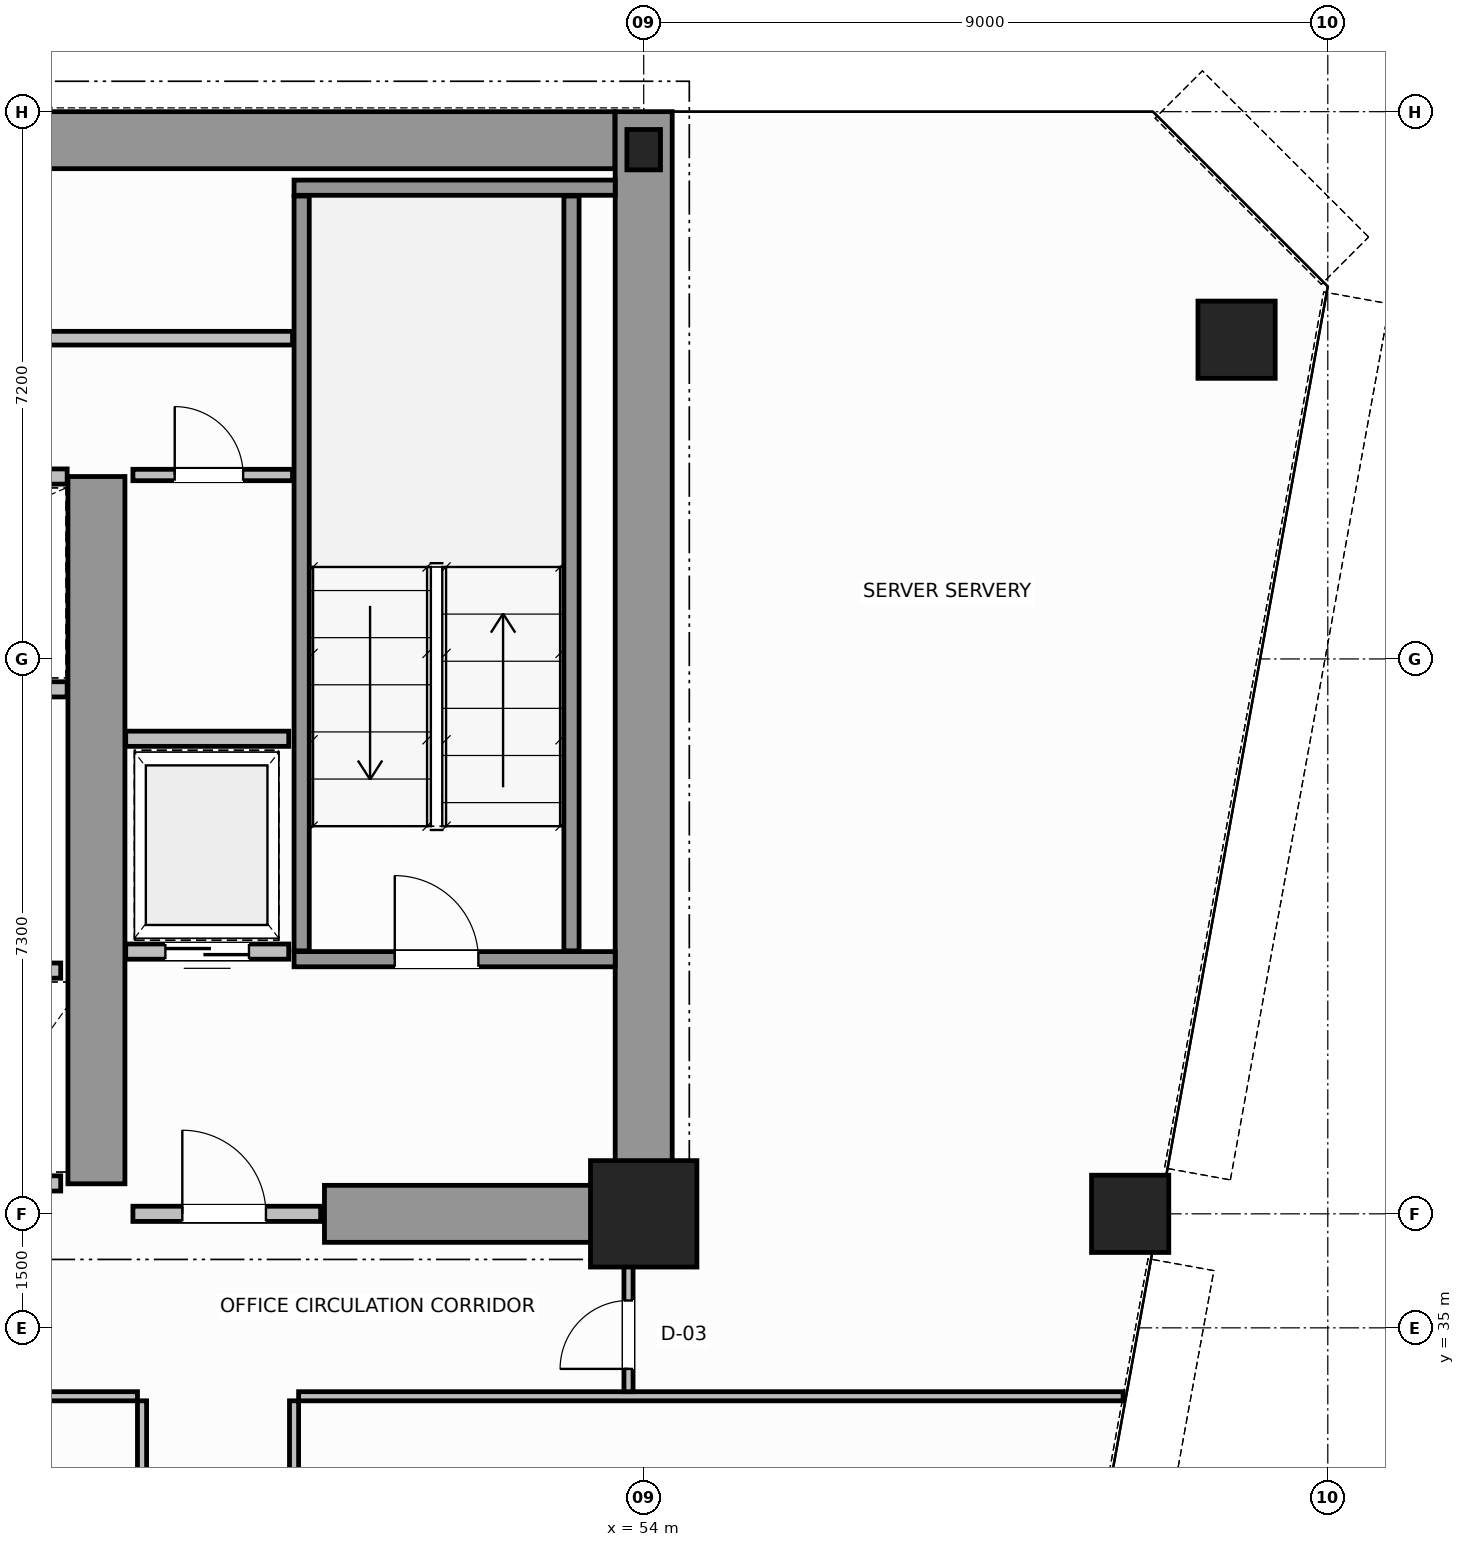
"""IFC4 building model, lengths in metres.
Left out: names, types, materials, properties, quantities, classifications, styles, units other than length and angle.
Written with IfcOpenShell. Run it as: python <this file> out.ifc"""

import sys

from ifc_helpers import new_model, si_unit, direction, frame, frame_2d, origin, origin_2d, place, context, subcontext, project, spatial, rectangle, hollow_circle, i_section, extrude, source, transform, mapped, element, fill, save


model = new_model("IFC4")
c1 = context("Model", 3, precision=1e-05, world=origin(), true_north=direction((0.0, 1.0)))
c2 = subcontext(c1, "Body", "Model", "MODEL_VIEW")
j1 = project(units=[si_unit("LENGTHUNIT", "METRE"), si_unit("PLANEANGLEUNIT", "RADIAN")], contexts=[c1])
p1 = place(None, origin())
s1 = spatial("IfcSite", under=j1, at=p1, CompositionType="ELEMENT")
p2 = place(p1, origin())
s2 = spatial("IfcBuilding", under=s1, at=p2, CompositionType="ELEMENT")
p3 = place(p2, frame((0.0, 0.0, 130.0)))
s3 = spatial("IfcBuildingStorey", under=s2, at=p3, CompositionType="ELEMENT", Elevation=130.0)
m1 = source(origin(), c2, "Body", "SweptSolid", [
    extrude(rectangle(XDim=1.4, YDim=1.4, at=origin_2d()), origin(), (0.0, 0.0, 1.0), 3.8),
])
p4 = place(p3, frame((54.0, 36.5, 0.0), z_axis=(0.0, 0.0, 1.0), x_axis=(1.0, 0.0, 0.0)))
e1 = element("IfcColumn", 1, at=p4, inside=s3, PredefinedType="COLUMN", context=c2, shape_type="MappedRepresentation", body=[
    mapped(m1, transform((0.0, 0.0, 0.0), scale=1.0)),
])
m2 = source(origin(), c2, "Body", "SweptSolid", [
    extrude(i_section(OverallWidth=0.442, OverallDepth=0.531, WebThickness=0.065, FlangeThickness=0.076, FilletRadius=0.015, at=origin_2d()), origin(), (0.0, 0.0, 1.0), 3.8),
])
p5 = place(p3, frame((54.0, 50.5, 0.0), z_axis=(0.0, 0.0, 1.0), x_axis=(1.0, 0.0, 0.0)))
e2 = element("IfcColumn", 2, at=p5, inside=s3, PredefinedType="COLUMN", context=c2, shape_type="MappedRepresentation", body=[
    mapped(m2, transform((0.0, 0.0, 0.0), scale=1.0)),
])
m3 = source(origin(), c2, "Body", "SweptSolid", [
    extrude(hollow_circle(Radius=0.508, WallThickness=0.045, at=origin_2d()), origin(), (0.0, 0.0, 1.0), 3.8),
])
for number, where, z_axis, x_axis in (
    (3, (61.8, 48.0, 0.0), (0.0, 0.0, 1.0), (1.0, 0.0, 0.0)),
    (4, (60.4, 36.5, 0.0), (0.0, 0.0, 1.0), (1.0, 0.0, 0.0)),
):
    element("IfcColumn", number, at=place(p3, frame(where, z_axis=z_axis, x_axis=x_axis)), inside=s3, PredefinedType="COLUMN", context=c2, shape_type="MappedRepresentation", body=[
        mapped(m3, transform((0.0, 0.0, 0.0), scale=1.0)),
    ])
p6 = place(p3, frame((34.002, 50.625, 0.0), z_axis=(0.0, 0.0, 1.0), x_axis=(1.0, 0.0, 0.0)))
e5 = element("IfcWall", 5, at=p6, inside=s3, PredefinedType="SHEAR", context=c2, shape_type="SweptSolid", body=[
    extrude(rectangle(XDim=19.619, YDim=0.75, at=frame_2d((9.81, 0.0))), origin(), (0.0, 0.0, 1.0), 3.8),
])
p7 = place(p3, frame((54.0, 36.5, 0.0), z_axis=(0.0, 0.0, 1.0), x_axis=(0.0, 1.0, 0.0)))
e6 = element("IfcWall", 6, at=p7, inside=s3, PredefinedType="SHEAR", context=c2, shape_type="SweptSolid", body=[
    extrude(rectangle(XDim=14.5, YDim=0.75, at=frame_2d((7.25, 0.0))), origin(), (0.0, 0.0, 1.0), 3.8),
])
p8 = place(p3, frame((49.8, 36.5, 0.0), z_axis=(0.0, 0.0, 1.0), x_axis=(1.0, 0.0, 0.0)))
e7 = element("IfcWall", 7, at=p8, inside=s3, PredefinedType="SHEAR", context=c2, shape_type="SweptSolid", body=[
    extrude(rectangle(XDim=3.805, YDim=0.75, at=frame_2d((1.902, 0.0))), origin(), (0.0, 0.0, 1.0), 2.38),
])
p9 = place(p3, frame((46.8, 36.895, 0.0), z_axis=(0.0, 0.0, 1.0), x_axis=(0.0, 1.0, 0.0)))
e8 = element("IfcWall", 8, at=p9, inside=s3, PredefinedType="SHEAR", context=c2, shape_type="SweptSolid", body=[
    extrude(rectangle(XDim=9.305, YDim=0.75, at=frame_2d((4.652, 0.0))), origin(), (0.0, 0.0, 1.0), 3.8),
])
p10 = place(p3, frame((49.4, 39.85, 0.0), z_axis=(0.0, 0.0, 1.0), x_axis=(1.0, 0.0, 0.0)))
e9 = element("IfcWall", 9, at=p10, inside=s3, PredefinedType="SOLIDWALL", context=c2, shape_type="SweptSolid", body=[
    extrude(rectangle(XDim=4.225, YDim=0.2, at=frame_2d((2.113, 0.0))), origin(), (0.0, 0.0, 1.0), 3.8),
])
p11 = place(p10, frame((1.325, 0.0, 0.0)))
e10 = element("IfcOpeningElement", 10, at=p11, cuts=e9, PredefinedType="OPENING", context=c2, shape_type="SweptSolid", body=[
    extrude(rectangle(XDim=1.1, YDim=2.15, at=frame_2d((0.55, 1.075))), frame((0.0, 0.11, 0.0), z_axis=(0.0, -1.0, 0.0), x_axis=(1.0, 0.0, 0.0)), (0.0, 0.0, 1.0), 0.22),
])
p12 = place(p3, frame((49.4, 50.0, 0.0), z_axis=(0.0, 0.0, 1.0), x_axis=(1.0, 0.0, 0.0)))
e11 = element("IfcWall", 11, at=p12, inside=s3, PredefinedType="SOLIDWALL", context=c2, shape_type="SweptSolid", body=[
    extrude(rectangle(XDim=4.225, YDim=0.2, at=frame_2d((2.113, 0.0))), origin(), (0.0, 0.0, 1.0), 3.8),
])
for number, where, z_axis, x_axis in (
    (12, (49.5, 39.96, 0.0), (0.0, 0.0, 1.0), (0.0, 1.0, 0.0)),
    (13, (53.05, 39.96, 0.0), (0.0, 0.0, 1.0), (0.0, 1.0, 0.0)),
):
    element("IfcWall", number, at=place(p3, frame(where, z_axis=z_axis, x_axis=x_axis)), inside=s3, PredefinedType="SOLIDWALL", context=c2, shape_type="SweptSolid", body=[
        extrude(rectangle(XDim=9.93, YDim=0.2, at=frame_2d((4.965, 0.0))), origin(), (0.0, 0.0, 1.0), 3.8),
    ])
p13 = place(p3, frame((47.28, 36.5, 0.0), z_axis=(0.0, 0.0, 1.0), x_axis=(1.0, 0.0, 0.0)))
e14 = element("IfcWall", 14, at=p13, inside=s3, PredefinedType="SOLIDWALL", context=c2, shape_type="SweptSolid", body=[
    extrude(rectangle(XDim=2.47, YDim=0.2, at=frame_2d((1.235, 0.0))), origin(), (0.0, 0.0, 1.0), 2.37),
])
p14 = place(p13, frame((0.65, 0.0, 0.0)))
e15 = element("IfcOpeningElement", 15, at=p14, cuts=e14, PredefinedType="OPENING", context=c2, shape_type="SweptSolid", body=[
    extrude(rectangle(XDim=1.1, YDim=2.15, at=frame_2d((0.55, 1.075))), frame((0.0, 0.11, 0.0), z_axis=(0.0, -1.0, 0.0), x_axis=(1.0, 0.0, 0.0)), (0.0, 0.0, 1.0), 0.22),
])
p15 = place(p3, frame((44.37, 39.7, 0.0), z_axis=(0.0, 0.0, 1.0), x_axis=(1.0, 0.0, 0.0)))
e16 = element("IfcWall", 16, at=p15, inside=s3, PredefinedType="SOLIDWALL", context=c2, shape_type="SweptSolid", body=[
    extrude(rectangle(XDim=1.96, YDim=0.2, at=frame_2d((0.98, 0.0))), origin(), (0.0, 0.0, 1.0), 3.58),
])
p16 = place(p3, frame((44.37, 36.9, 0.0), z_axis=(0.0, 0.0, 1.0), x_axis=(1.0, 0.0, 0.0)))
e17 = element("IfcWall", 17, at=p16, inside=s3, PredefinedType="SOLIDWALL", context=c2, shape_type="SweptSolid", body=[
    extrude(rectangle(XDim=1.96, YDim=0.2, at=frame_2d((0.98, 0.0))), origin(), (0.0, 0.0, 1.0), 2.37),
])
for number, where, z_axis, x_axis in (
    (18, (44.62, 43.4, 0.0), (0.0, 0.0, 1.0), (1.0, 0.0, 0.0)),
    (19, (44.62, 46.2, 0.0), (0.0, 0.0, 1.0), (1.0, 0.0, 0.0)),
):
    element("IfcWall", number, at=place(p3, frame(where, z_axis=z_axis, x_axis=x_axis)), inside=s3, PredefinedType="SOLIDWALL", context=c2, shape_type="SweptSolid", body=[
        extrude(rectangle(XDim=1.795, YDim=0.2, at=frame_2d((0.897, 0.0))), origin(), (0.0, 0.0, 1.0), 3.58),
    ])
p17 = place(p3, frame((47.185, 39.95, 0.0), z_axis=(0.0, 0.0, 1.0), x_axis=(1.0, 0.0, 0.0)))
e20 = element("IfcWall", 20, at=p17, inside=s3, PredefinedType="SOLIDWALL", context=c2, shape_type="SweptSolid", body=[
    extrude(rectangle(XDim=2.145, YDim=0.2, at=frame_2d((1.073, 0.0))), origin(), (0.0, 0.0, 1.0), 3.58),
])
p18 = place(p17, frame((0.522, 0.0, 0.0)))
e21 = element("IfcOpeningElement", 21, at=p18, cuts=e20, PredefinedType="OPENING", context=c2, shape_type="SweptSolid", body=[
    extrude(rectangle(XDim=1.1, YDim=2.15, at=frame_2d((0.55, 1.075))), frame((0.0, 0.11, 0.0), z_axis=(0.0, -1.0, 0.0), x_axis=(1.0, 0.0, 0.0)), (0.0, 0.0, 1.0), 0.22),
])
p19 = place(p3, frame((47.185, 42.75, 0.0), z_axis=(0.0, 0.0, 1.0), x_axis=(1.0, 0.0, 0.0)))
e22 = element("IfcWall", 22, at=p19, inside=s3, PredefinedType="SOLIDWALL", context=c2, shape_type="SweptSolid", body=[
    extrude(rectangle(XDim=2.145, YDim=0.2, at=frame_2d((1.073, 0.0))), origin(), (0.0, 0.0, 1.0), 3.58),
])
p20 = place(p3, frame((47.28, 46.22, 0.0), z_axis=(0.0, 0.0, 1.0), x_axis=(1.0, 0.0, 0.0)))
e23 = element("IfcWall", 23, at=p20, inside=s3, PredefinedType="PARTITIONING", context=c2, shape_type="SweptSolid", body=[
    extrude(rectangle(XDim=2.1, YDim=0.15, at=frame_2d((1.05, 0.0))), origin(), (0.0, 0.0, 1.0), 3.58),
])
p21 = place(p20, frame((0.55, 0.0, 0.0)))
e24 = element("IfcOpeningElement", 24, at=p21, cuts=e23, PredefinedType="OPENING", context=c2, shape_type="SweptSolid", body=[
    extrude(rectangle(XDim=0.9, YDim=2.1, at=frame_2d((0.45, 1.05))), frame((0.0, 0.085, 0.0), z_axis=(0.0, -1.0, 0.0), x_axis=(1.0, 0.0, 0.0)), (0.0, 0.0, 1.0), 0.17),
])
p22 = place(p3, frame((18.62, 48.02, 0.0), z_axis=(0.0, 0.0, 1.0), x_axis=(1.0, 0.0, 0.0)))
e25 = element("IfcWall", 25, at=p22, inside=s3, PredefinedType="PLUMBINGWALL", context=c2, shape_type="SweptSolid", body=[
    extrude(rectangle(XDim=30.76, YDim=0.18, at=frame_2d((15.38, 0.0))), origin(), (0.0, 0.0, 1.0), 3.58),
])
p23 = place(p22, frame((1.955, 0.0, 0.0)))
e26 = element("IfcOpeningElement", 26, at=p23, cuts=e25, PredefinedType="OPENING", context=c2, shape_type="SweptSolid", body=[
    extrude(rectangle(XDim=0.9, YDim=2.15, at=frame_2d((0.45, 1.075))), frame((0.0, 0.1, 0.0), z_axis=(0.0, -1.0, 0.0), x_axis=(1.0, 0.0, 0.0)), (0.0, 0.0, 1.0), 0.2),
])
p24 = place(p22, frame((8.03, 0.0, 0.0)))
e27 = element("IfcOpeningElement", 27, at=p24, cuts=e25, PredefinedType="OPENING", context=c2, shape_type="SweptSolid", body=[
    extrude(rectangle(XDim=0.9, YDim=2.15, at=frame_2d((0.45, 1.075))), frame((0.0, 0.1, 0.0), z_axis=(0.0, -1.0, 0.0), x_axis=(1.0, 0.0, 0.0)), (0.0, 0.0, 1.0), 0.2),
])
p25 = place(p22, frame((16.93, 0.0, 0.0)))
e28 = element("IfcOpeningElement", 28, at=p25, cuts=e25, PredefinedType="OPENING", context=c2, shape_type="SweptSolid", body=[
    extrude(rectangle(XDim=0.9, YDim=2.15, at=frame_2d((0.45, 1.075))), frame((0.0, 0.1, 0.0), z_axis=(0.0, -1.0, 0.0), x_axis=(1.0, 0.0, 0.0)), (0.0, 0.0, 1.0), 0.2),
])
p26 = place(p22, frame((26.205, 0.0, 0.0)))
e29 = element("IfcOpeningElement", 29, at=p26, cuts=e25, PredefinedType="OPENING", context=c2, shape_type="SweptSolid", body=[
    extrude(rectangle(XDim=0.9, YDim=2.15, at=frame_2d((0.45, 1.075))), frame((0.0, 0.1, 0.0), z_axis=(0.0, -1.0, 0.0), x_axis=(1.0, 0.0, 0.0)), (0.0, 0.0, 1.0), 0.2),
])
p27 = place(p3, frame((20.66, 34.1, 0.0), z_axis=(0.0, 0.0, 1.0), x_axis=(1.0, 0.0, 0.0)))
e30 = element("IfcWall", 30, at=p27, inside=s3, PredefinedType="PARTITIONING", context=c2, shape_type="SweptSolid", body=[
    extrude(rectangle(XDim=26.68, YDim=0.12, at=frame_2d((13.34, 0.0))), origin(), (0.0, 0.0, 1.0), 3.58),
])
p28 = place(p27, frame((3.39, 0.0, 0.0)))
e31 = element("IfcOpeningElement", 31, at=p28, cuts=e30, PredefinedType="OPENING", context=c2, shape_type="SweptSolid", body=[
    extrude(rectangle(XDim=0.9, YDim=2.15, at=frame_2d((0.45, 1.075))), frame((0.0, 0.07, 0.0), z_axis=(0.0, -1.0, 0.0), x_axis=(1.0, 0.0, 0.0)), (0.0, 0.0, 1.0), 0.14),
])
p29 = place(p27, frame((12.89, 0.0, 0.0)))
e32 = element("IfcOpeningElement", 32, at=p29, cuts=e30, PredefinedType="OPENING", context=c2, shape_type="SweptSolid", body=[
    extrude(rectangle(XDim=0.9, YDim=2.15, at=frame_2d((0.45, 1.075))), frame((0.0, 0.07, 0.0), z_axis=(0.0, -1.0, 0.0), x_axis=(1.0, 0.0, 0.0)), (0.0, 0.0, 1.0), 0.14),
])
p30 = place(p27, frame((22.39, 0.0, 0.0)))
e33 = element("IfcOpeningElement", 33, at=p30, cuts=e30, PredefinedType="OPENING", context=c2, shape_type="SweptSolid", body=[
    extrude(rectangle(XDim=0.9, YDim=2.15, at=frame_2d((0.45, 1.075))), frame((0.0, 0.07, 0.0), z_axis=(0.0, -1.0, 0.0), x_axis=(1.0, 0.0, 0.0)), (0.0, 0.0, 1.0), 0.14),
])
p31 = place(p3, frame((49.46, 34.1, 0.0), z_axis=(0.0, 0.0, 1.0), x_axis=(1.0, 0.0, 0.0)))
e34 = element("IfcWall", 34, at=p31, inside=s3, PredefinedType="PARTITIONING", context=c2, shape_type="SweptSolid", body=[
    extrude(rectangle(XDim=10.847, YDim=0.12, at=frame_2d((5.424, 0.0))), origin(), (0.0, 0.0, 1.0), 3.58),
])
p32 = place(p3, frame((53.8, 34.16, 0.0), z_axis=(0.0, 0.0, 1.0), x_axis=(0.0, 1.0, 0.0)))
e35 = element("IfcWall", 35, at=p32, inside=s3, PredefinedType="PARTITIONING", context=c2, shape_type="SweptSolid", body=[
    extrude(rectangle(XDim=2.28, YDim=0.12, at=frame_2d((1.14, 0.0))), origin(), (0.0, 0.0, 1.0), 3.58),
])
p33 = place(p32, frame((0.3, 0.0, 0.0)))
e36 = element("IfcOpeningElement", 36, at=p33, cuts=e35, PredefinedType="OPENING", context=c2, shape_type="SweptSolid", body=[
    extrude(rectangle(XDim=0.9, YDim=2.15, at=frame_2d((0.45, 1.075))), frame((0.0, 0.07, 0.0), z_axis=(0.0, -1.0, 0.0), x_axis=(1.0, 0.0, 0.0)), (0.0, 0.0, 1.0), 0.14),
])
p34 = place(p3, frame((47.4, 17.2, 0.0), z_axis=(0.0, 0.0, 1.0), x_axis=(0.0, 1.0, 0.0)))
e37 = element("IfcWall", 37, at=p34, inside=s3, PredefinedType="PARTITIONING", context=c2, shape_type="SweptSolid", body=[
    extrude(rectangle(XDim=16.84, YDim=0.12, at=frame_2d((8.42, 0.0))), origin(), (0.0, 0.0, 1.0), 3.58),
])
p35 = place(p3, frame((49.4, 17.2, 0.0), z_axis=(0.0, 0.0, 1.0), x_axis=(0.0, 1.0, 0.0)))
e38 = element("IfcWall", 38, at=p35, inside=s3, PredefinedType="PARTITIONING", context=c2, shape_type="SweptSolid", body=[
    extrude(rectangle(XDim=16.84, YDim=0.12, at=frame_2d((8.42, 0.0))), origin(), (0.0, 0.0, 1.0), 3.58),
])
p36 = place(p35, frame((2.75, 0.0, 0.0)))
e39 = element("IfcOpeningElement", 39, at=p36, cuts=e38, PredefinedType="OPENING", context=c2, shape_type="SweptSolid", body=[
    extrude(rectangle(XDim=0.9, YDim=2.15, at=frame_2d((0.45, 1.075))), frame((0.0, 0.07, 0.0), z_axis=(0.0, -1.0, 0.0), x_axis=(1.0, 0.0, 0.0)), (0.0, 0.0, 1.0), 0.14),
])
p37 = place(p35, frame((9.05, 0.0, 0.0)))
e40 = element("IfcOpeningElement", 40, at=p37, cuts=e38, PredefinedType="OPENING", context=c2, shape_type="SweptSolid", body=[
    extrude(rectangle(XDim=0.9, YDim=2.15, at=frame_2d((0.45, 1.075))), frame((0.0, 0.07, 0.0), z_axis=(0.0, -1.0, 0.0), x_axis=(1.0, 0.0, 0.0)), (0.0, 0.0, 1.0), 0.14),
])
p38 = place(p35, frame((14.27, 0.0, 0.0)))
e41 = element("IfcOpeningElement", 41, at=p38, cuts=e38, PredefinedType="OPENING", context=c2, shape_type="SweptSolid", body=[
    extrude(rectangle(XDim=0.9, YDim=2.15, at=frame_2d((0.45, 1.075))), frame((0.0, 0.07, 0.0), z_axis=(0.0, -1.0, 0.0), x_axis=(1.0, 0.0, 0.0)), (0.0, 0.0, 1.0), 0.14),
])
m4 = source(origin(), c2, "Body", "SweptSolid", [
    extrude(rectangle(XDim=1.1, YDim=2.15, at=frame_2d((0.55, 1.075))), frame((0.0, 0.025, 0.0), z_axis=(0.0, -1.0, 0.0), x_axis=(1.0, 0.0, 0.0)), (0.0, 0.0, 1.0), 0.05),
])
p39 = place(p11, origin())
e42 = element("IfcDoor", 42, at=p39, inside=s3, OperationType="SINGLE_SWING_RIGHT", PredefinedType="DOOR", context=c2, shape_type="MappedRepresentation", body=[
    mapped(m4, transform((0.0, 0.0, 0.0), scale=1.0)),
])
fill(e10, e42)
p40 = place(p14, origin())
e43 = element("IfcDoor", 43, at=p40, inside=s3, OperationType="SINGLE_SWING_LEFT", PredefinedType="DOOR", context=c2, shape_type="MappedRepresentation", body=[
    mapped(m4, transform((0.0, 0.0, 0.0), scale=1.0)),
])
fill(e15, e43)
p41 = place(p18, origin())
e44 = element("IfcDoor", 44, at=p41, inside=s3, OperationType="DOUBLE_DOOR_SLIDING", PredefinedType="DOOR", context=c2, shape_type="MappedRepresentation", body=[
    mapped(m4, transform((0.0, 0.0, 0.0), scale=1.0)),
])
fill(e21, e44)
m5 = source(origin(), c2, "Body", "SweptSolid", [
    extrude(rectangle(XDim=0.9, YDim=2.1, at=frame_2d((0.45, 1.05))), frame((0.0, 0.025, 0.0), z_axis=(0.0, -1.0, 0.0), x_axis=(1.0, 0.0, 0.0)), (0.0, 0.0, 1.0), 0.05),
])
p42 = place(p21, origin())
e45 = element("IfcDoor", 45, at=p42, inside=s3, OperationType="SINGLE_SWING_RIGHT", PredefinedType="DOOR", context=c2, shape_type="MappedRepresentation", body=[
    mapped(m5, transform((0.0, 0.0, 0.0), scale=1.0)),
])
fill(e24, e45)
m6 = source(origin(), c2, "Body", "SweptSolid", [
    extrude(rectangle(XDim=0.9, YDim=2.15, at=frame_2d((0.45, 1.075))), frame((0.0, 0.025, 0.0), z_axis=(0.0, -1.0, 0.0), x_axis=(1.0, 0.0, 0.0)), (0.0, 0.0, 1.0), 0.05),
])
p43 = place(p33, origin())
e46 = element("IfcDoor", 46, at=p43, inside=s3, OperationType="SINGLE_SWING_RIGHT", PredefinedType="DOOR", context=c2, shape_type="MappedRepresentation", body=[
    mapped(m6, transform((0.0, 0.0, 0.0), scale=1.0)),
])
fill(e36, e46)
save(model, sys.argv[1])
